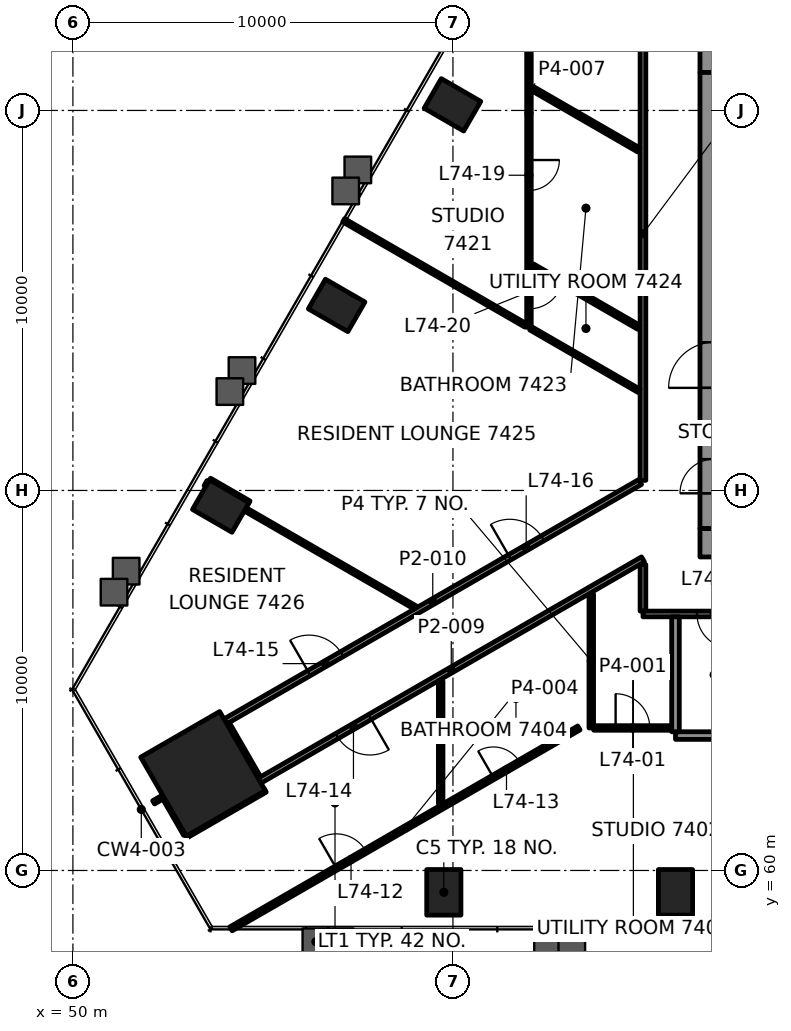
"""IFC4 building model, lengths in metres.
Left out: names, types, materials, properties, quantities, classifications, styles, units other than length and angle.
Written with IfcOpenShell. Run it as: python <this file> out.ifc"""

import sys

from ifc_helpers import new_model, si_unit, direction, frame, frame_2d, origin, origin_2d, place, context, subcontext, project, spatial, rectangle, hollow_rectangle, extrude, element, fill, save


model = new_model("IFC4")
c1 = context("Model", 3, precision=1e-05, world=origin(), true_north=direction((0.0, 1.0)))
c2 = subcontext(c1, "Body", "Model", "MODEL_VIEW")
j1 = project(units=[si_unit("LENGTHUNIT", "METRE"), si_unit("PLANEANGLEUNIT", "RADIAN")], contexts=[c1])
p1 = place(None, origin())
s1 = spatial("IfcSite", under=j1, at=p1, CompositionType="ELEMENT")
p2 = place(p1, origin())
s2 = spatial("IfcBuilding", under=s1, at=p2, CompositionType="ELEMENT")
p3 = place(p2, frame((0.0, 0.0, 305.6)))
s3 = spatial("IfcBuildingStorey", under=s2, at=p3, CompositionType="ELEMENT", Elevation=305.6)
p4 = place(p3, frame((53.423, 62.542, 0.0), z_axis=(0.0, 0.0, 1.0), x_axis=(0.5, -0.866025403784, 0.0)))
e1 = element("IfcColumn", 1, at=p4, inside=s3, PredefinedType="COLUMN", context=c2, shape_type="SweptSolid", body=[
    extrude(rectangle(XDim=2.4, YDim=2.4, at=origin_2d()), origin(), (0.0, 0.0, 1.0), 3.5),
])
for number, where, z_axis, x_axis in (
    (2, (59.76, 59.425, -0.0), (0.0, 0.0, 1.0), (1.0, 0.0, 0.0)),
    (3, (65.856, 59.425, -0.0), (0.0, 0.0, 1.0), (1.0, 0.0, 0.0)),
    (4, (59.987, 80.148, -0.0), (0.0, 0.0, 1.0), (-0.5, -0.866, 0.0)),
    (5, (56.939, 74.869, -0.0), (0.0, 0.0, 1.0), (-0.5, -0.866, 0.0)),
    (6, (53.891, 69.589, -0.0), (0.0, 0.0, 1.0), (-0.5, -0.866, 0.0)),
):
    element("IfcColumn", number, at=place(p3, frame(where, z_axis=z_axis, x_axis=x_axis)), inside=s3, PredefinedType="COLUMN", context=c2, shape_type="SweptSolid", body=[
        extrude(hollow_rectangle(XDim=0.9, YDim=1.2, WallThickness=0.06, at=origin_2d()), origin(), (0.0, 0.0, 1.0), 3.5),
    ])
p5 = place(p3, frame((66.5, 68.625, 0.0), z_axis=(0.0, 0.0, 1.0), x_axis=(1.0, 0.0, 0.0)))
e7 = element("IfcWall", 7, at=p5, inside=s3, PredefinedType="SHEAR", context=c2, shape_type="SweptSolid", body=[
    extrude(rectangle(XDim=17.0, YDim=0.75, at=frame_2d((8.5, 0.0))), origin(), (0.0, 0.0, 1.0), 3.3),
])
p6 = place(p5, frame((2.7, 0.0, 0.0)))
e8 = element("IfcOpeningElement", 8, at=p6, cuts=e7, PredefinedType="OPENING", context=c2, shape_type="SweptSolid", body=[
    extrude(rectangle(XDim=0.9, YDim=2.1, at=frame_2d((0.45, 1.05))), frame((0.0, 0.385, 0.0), z_axis=(0.0, -1.0, 0.0), x_axis=(1.0, 0.0, 0.0)), (0.0, 0.0, 1.0), 0.77),
])
p7 = place(p3, frame((66.5, 81.375, 0.0), z_axis=(0.0, 0.0, 1.0), x_axis=(1.0, 0.0, 0.0)))
e9 = element("IfcWall", 9, at=p7, inside=s3, PredefinedType="SHEAR", context=c2, shape_type="SweptSolid", body=[
    extrude(rectangle(XDim=17.0, YDim=0.75, at=frame_2d((8.5, 0.0))), origin(), (0.0, 0.0, 1.0), 3.3),
])
p8 = place(p7, frame((1.195, 0.0, 0.0)))
e10 = element("IfcOpeningElement", 10, at=p8, cuts=e9, PredefinedType="OPENING", context=c2, shape_type="SweptSolid", body=[
    extrude(rectangle(XDim=1.0, YDim=2.1, at=frame_2d((0.5, 1.05))), frame((0.0, 0.385, 0.0), z_axis=(0.0, -1.0, 0.0), x_axis=(1.0, 0.0, 0.0)), (0.0, 0.0, 1.0), 0.77),
])
p9 = place(p7, frame((15.005, 0.0, 0.0)))
e11 = element("IfcOpeningElement", 11, at=p9, cuts=e9, PredefinedType="OPENING", context=c2, shape_type="SweptSolid", body=[
    extrude(rectangle(XDim=1.0, YDim=2.1, at=frame_2d((0.5, 1.05))), frame((0.0, 0.385, 0.0), z_axis=(0.0, -1.0, 0.0), x_axis=(1.0, 0.0, 0.0)), (0.0, 0.0, 1.0), 0.77),
])
p10 = place(p7, frame((8.15, 0.0, 0.0)))
e12 = element("IfcOpeningElement", 12, at=p10, cuts=e9, PredefinedType="OPENING", context=c2, shape_type="SweptSolid", body=[
    extrude(rectangle(XDim=0.9, YDim=2.1, at=frame_2d((0.45, 1.05))), frame((0.0, 0.385, 0.0), z_axis=(0.0, -1.0, 0.0), x_axis=(1.0, 0.0, 0.0)), (0.0, 0.0, 1.0), 0.77),
])
p11 = place(p3, frame((66.875, 69.0, 0.0), z_axis=(0.0, 0.0, 1.0), x_axis=(0.0, 1.0, 0.0)))
e13 = element("IfcWall", 13, at=p11, inside=s3, PredefinedType="SHEAR", context=c2, shape_type="SweptSolid", body=[
    extrude(rectangle(XDim=12.0, YDim=0.75, at=frame_2d((6.0, 0.0))), origin(), (0.0, 0.0, 1.0), 3.3),
])
p12 = place(p11, frame((3.7, 0.0, 0.0)))
e14 = element("IfcOpeningElement", 14, at=p12, cuts=e13, PredefinedType="OPENING", context=c2, shape_type="SweptSolid", body=[
    extrude(rectangle(XDim=1.2, YDim=2.1, at=frame_2d((0.6, 1.05))), frame((0.0, 0.385, 0.0), z_axis=(0.0, -1.0, 0.0), x_axis=(1.0, 0.0, 0.0)), (0.0, 0.0, 1.0), 0.77),
])
p13 = place(p11, frame((0.925, 0.0, 0.0)))
e15 = element("IfcOpeningElement", 15, at=p13, cuts=e13, PredefinedType="OPENING", context=c2, shape_type="SweptSolid", body=[
    extrude(rectangle(XDim=0.9, YDim=2.1, at=frame_2d((0.45, 1.05))), frame((0.0, 0.385, 0.0), z_axis=(0.0, -1.0, 0.0), x_axis=(1.0, 0.0, 0.0)), (0.0, 0.0, 1.0), 0.77),
])
p14 = place(p3, frame((65.856, 63.55, 0.0), z_axis=(0.0, 0.0, 1.0), x_axis=(1.0, 0.0, 0.0)))
e16 = element("IfcWall", 16, at=p14, inside=s3, PredefinedType="PARTITIONING", context=c2, shape_type="SweptSolid", body=[
    extrude(rectangle(XDim=8.128, YDim=0.2, at=frame_2d((4.064, 0.0))), origin(), (0.0, 0.0, 1.0), 2.7),
])
p15 = place(p3, frame((63.704, 63.75, 0.0), z_axis=(0.0, 0.0, 1.0), x_axis=(1.0, 0.0, 0.0)))
e17 = element("IfcWall", 17, at=p15, inside=s3, PredefinedType="PARTITIONING", context=c2, shape_type="SweptSolid", body=[
    extrude(rectangle(XDim=2.052, YDim=0.12, at=frame_2d((1.026, 0.0))), origin(), (0.0, 0.0, 1.0), 2.7),
])
p16 = place(p15, frame((0.576, 0.0, 0.0)))
e18 = element("IfcOpeningElement", 18, at=p16, cuts=e17, PredefinedType="OPENING", context=c2, shape_type="SweptSolid", body=[
    extrude(rectangle(XDim=0.9, YDim=2.1, at=frame_2d((0.45, 1.05))), frame((0.0, 0.07, 0.0), z_axis=(0.0, -1.0, 0.0), x_axis=(1.0, 0.0, 0.0)), (0.0, 0.0, 1.0), 0.14),
])
p17 = place(p3, frame((85.0, 66.75, 0.0), z_axis=(0.0, 0.0, 1.0), x_axis=(-1.0, 0.0, 0.0)))
e19 = element("IfcWall", 19, at=p17, inside=s3, PredefinedType="PARTITIONING", context=c2, shape_type="SweptSolid", body=[
    extrude(rectangle(XDim=20.0, YDim=0.15, at=frame_2d((10.0, 0.0))), origin(), (0.0, 0.0, 1.0), 2.7),
])
p18 = place(p17, frame((5.486, 0.0, 0.0)))
e20 = element("IfcOpeningElement", 20, at=p18, cuts=e19, PredefinedType="OPENING", context=c2, shape_type="SweptSolid", body=[
    extrude(rectangle(XDim=0.9, YDim=2.1, at=frame_2d((0.45, 1.05))), frame((0.0, 0.085, 0.0), z_axis=(0.0, -1.0, 0.0), x_axis=(1.0, 0.0, 0.0)), (0.0, 0.0, 1.0), 0.17),
])
p19 = place(p17, frame((11.582, 0.0, 0.0)))
e21 = element("IfcOpeningElement", 21, at=p19, cuts=e19, PredefinedType="OPENING", context=c2, shape_type="SweptSolid", body=[
    extrude(rectangle(XDim=0.9, YDim=2.1, at=frame_2d((0.45, 1.05))), frame((0.0, 0.085, 0.0), z_axis=(0.0, -1.0, 0.0), x_axis=(1.0, 0.0, 0.0)), (0.0, 0.0, 1.0), 0.17),
])
p20 = place(p17, frame((13.614, 0.0, 0.0)))
e22 = element("IfcOpeningElement", 22, at=p20, cuts=e19, PredefinedType="OPENING", context=c2, shape_type="SweptSolid", body=[
    extrude(rectangle(XDim=0.9, YDim=2.1, at=frame_2d((0.45, 1.05))), frame((0.0, 0.085, 0.0), z_axis=(0.0, -1.0, 0.0), x_axis=(1.0, 0.0, 0.0)), (0.0, 0.0, 1.0), 0.17),
])
p21 = place(p17, frame((15.646, 0.0, 0.0)))
e23 = element("IfcOpeningElement", 23, at=p21, cuts=e19, PredefinedType="OPENING", context=c2, shape_type="SweptSolid", body=[
    extrude(rectangle(XDim=0.9, YDim=2.1, at=frame_2d((0.45, 1.05))), frame((0.0, 0.085, 0.0), z_axis=(0.0, -1.0, 0.0), x_axis=(1.0, 0.0, 0.0)), (0.0, 0.0, 1.0), 0.17),
])
p22 = place(p17, frame((17.678, 0.0, 0.0)))
e24 = element("IfcOpeningElement", 24, at=p22, cuts=e19, PredefinedType="OPENING", context=c2, shape_type="SweptSolid", body=[
    extrude(rectangle(XDim=0.9, YDim=2.1, at=frame_2d((0.45, 1.05))), frame((0.0, 0.085, 0.0), z_axis=(0.0, -1.0, 0.0), x_axis=(1.0, 0.0, 0.0)), (0.0, 0.0, 1.0), 0.17),
])
p23 = place(p3, frame((54.16, 58.465, 0.0), z_axis=(0.0, 0.0, 1.0), x_axis=(0.866034434898, 0.499984357326, 0.0)))
e25 = element("IfcWall", 25, at=p23, inside=s3, PredefinedType="PARTITIONING", context=c2, shape_type="SweptSolid", body=[
    extrude(rectangle(XDim=10.571, YDim=0.12, at=frame_2d((5.285, 0.0))), origin(), (0.0, 0.0, 1.0), 2.7),
])
p24 = place(p23, frame((3.197, 0.0, 0.0)))
e26 = element("IfcOpeningElement", 26, at=p24, cuts=e25, PredefinedType="OPENING", context=c2, shape_type="SweptSolid", body=[
    extrude(rectangle(XDim=0.9, YDim=2.1, at=frame_2d((0.45, 1.05))), frame((0.0, 0.07, 0.0), z_axis=(0.0, -1.0, 0.0), x_axis=(1.0, 0.0, 0.0)), (0.0, 0.0, 1.0), 0.14),
])
p25 = place(p23, frame((7.97, 0.0, 0.0)))
e27 = element("IfcOpeningElement", 27, at=p25, cuts=e25, PredefinedType="OPENING", context=c2, shape_type="SweptSolid", body=[
    extrude(rectangle(XDim=0.8, YDim=2.1, at=frame_2d((0.4, 1.05))), frame((0.0, 0.07, 0.0), z_axis=(0.0, -1.0, 0.0), x_axis=(1.0, 0.0, 0.0)), (0.0, 0.0, 1.0), 0.14),
])
p26 = place(p3, frame((52.984, 60.904, 0.0), z_axis=(0.0, 0.0, 1.0), x_axis=(0.866011011868, 0.500024926702, 0.0)))
e28 = element("IfcWall", 28, at=p26, inside=s3, PredefinedType="PARTITIONING", context=c2, shape_type="SweptSolid", body=[
    extrude(rectangle(XDim=2.399, YDim=0.1, at=frame_2d((1.199, 0.0))), origin(), (0.0, 0.0, 1.0), 2.7),
])
p27 = place(p3, frame((65.0, 68.187, 0.0), z_axis=(0.0, 0.0, 1.0), x_axis=(-0.866026430432, -0.49999822179, 0.0)))
e29 = element("IfcWall", 29, at=p27, inside=s3, PredefinedType="PARTITIONING", context=c2, shape_type="SweptSolid", body=[
    extrude(rectangle(XDim=11.648, YDim=0.15, at=frame_2d((5.824, 0.0))), origin(), (0.0, 0.0, 1.0), 2.547),
])
p28 = place(p27, frame((8.296, 0.0, 0.0)))
e30 = element("IfcOpeningElement", 30, at=p28, cuts=e29, PredefinedType="OPENING", context=c2, shape_type="SweptSolid", body=[
    extrude(rectangle(XDim=1.0, YDim=2.1, at=frame_2d((0.5, 1.05))), frame((0.0, 0.085, 0.0), z_axis=(0.0, -1.0, 0.0), x_axis=(1.0, 0.0, 0.0)), (0.0, 0.0, 1.0), 0.17),
])
p29 = place(p3, frame((52.124, 61.792, 0.0), z_axis=(0.0, 0.0, 1.0), x_axis=(0.866006330792, 0.500033033937, 0.0)))
e31 = element("IfcWall", 31, at=p29, inside=s3, PredefinedType="PARTITIONING", context=c2, shape_type="SweptSolid", body=[
    extrude(rectangle(XDim=0.25, YDim=0.1, at=frame_2d((0.125, 0.0))), origin(), (0.0, 0.0, 1.0), 2.7),
])
p30 = place(p3, frame((54.012, 63.922, 0.0), z_axis=(0.0, 0.0, 1.0), x_axis=(0.866028779199, 0.499994153564, 0.0)))
e32 = element("IfcWall", 32, at=p30, inside=s3, PredefinedType="PARTITIONING", context=c2, shape_type="SweptSolid", body=[
    extrude(rectangle(XDim=12.601, YDim=0.15, at=frame_2d((6.3, 0.0))), origin(), (0.0, 0.0, 1.0), 2.7),
])
p31 = place(p30, frame((2.542, 0.0, 0.0)))
e33 = element("IfcOpeningElement", 33, at=p31, cuts=e32, PredefinedType="OPENING", context=c2, shape_type="SweptSolid", body=[
    extrude(rectangle(XDim=1.0, YDim=2.1, at=frame_2d((0.5, 1.05))), frame((0.0, 0.085, 0.0), z_axis=(0.0, -1.0, 0.0), x_axis=(1.0, 0.0, 0.0)), (0.0, 0.0, 1.0), 0.17),
])
p32 = place(p30, frame((8.639, 0.0, 0.0)))
e34 = element("IfcOpeningElement", 34, at=p32, cuts=e32, PredefinedType="OPENING", context=c2, shape_type="SweptSolid", body=[
    extrude(rectangle(XDim=1.0, YDim=2.1, at=frame_2d((0.5, 1.05))), frame((0.0, 0.085, 0.0), z_axis=(0.0, -1.0, 0.0), x_axis=(1.0, 0.0, 0.0)), (0.0, 0.0, 1.0), 0.17),
])
p33 = place(p3, frame((53.495, 70.102, 0.0), z_axis=(0.0, 0.0, 1.0), x_axis=(0.499906209203, 0.866079547155, 0.0)))
e35 = element("IfcWall", 35, at=p33, inside=s3, PredefinedType="PARTITIONING", context=c2, shape_type="SweptSolid", body=[
    extrude(rectangle(XDim=0.153, YDim=0.1, at=frame_2d((0.077, 0.0))), origin(), (0.0, 0.0, 1.0), 2.7),
])
p34 = place(p3, frame((65.856, 63.65, 0.0), z_axis=(0.0, 0.0, 1.0), x_axis=(0.0, 1.0, 0.0)))
e36 = element("IfcWall", 36, at=p34, inside=s3, PredefinedType="PARTITIONING", context=c2, shape_type="SweptSolid", body=[
    extrude(rectangle(XDim=3.025, YDim=0.2, at=frame_2d((1.513, 0.0))), origin(), (0.0, 0.0, 1.0), 2.7),
])
p35 = place(p3, frame((65.0, 66.825, 0.0), z_axis=(0.0, 0.0, 1.0), x_axis=(0.0, 1.0, 0.0)))
e37 = element("IfcWall", 37, at=p35, inside=s3, PredefinedType="PARTITIONING", context=c2, shape_type="SweptSolid", body=[
    extrude(rectangle(XDim=1.226, YDim=0.15, at=frame_2d((0.613, 0.0))), origin(), (0.0, 0.0, 1.0), 2.547),
])
p36 = place(p3, frame((65.0, 70.266, 0.0), z_axis=(0.0, 0.0, 1.0), x_axis=(0.0, 1.0, 0.0)))
e38 = element("IfcWall", 38, at=p36, inside=s3, PredefinedType="PARTITIONING", context=c2, shape_type="SweptSolid", body=[
    extrude(rectangle(XDim=12.984, YDim=0.15, at=frame_2d((6.492, 0.0))), origin(), (0.0, 0.0, 1.0), 2.7),
])
p37 = place(p3, frame((63.64, 63.75, 0.0), z_axis=(0.0, 0.0, 1.0), x_axis=(0.0, 1.0, 0.0)))
e39 = element("IfcWall", 39, at=p37, inside=s3, PredefinedType="PARTITIONING", context=c2, shape_type="SweptSolid", body=[
    extrude(rectangle(XDim=3.525, YDim=0.12, at=frame_2d((1.763, 0.0))), origin(), (0.0, 0.0, 1.0), 2.547),
])
p38 = place(p3, frame((62.0, 85.554, 0.0), z_axis=(0.0, 0.0, 1.0), x_axis=(0.0, -1.0, 0.0)))
e40 = element("IfcWall", 40, at=p38, inside=s3, PredefinedType="PARTITIONING", context=c2, shape_type="SweptSolid", body=[
    extrude(rectangle(XDim=11.261, YDim=0.12, at=frame_2d((5.63, 0.0))), origin(), (0.0, 0.0, 1.0), 2.688),
])
p39 = place(p38, frame((2.6, 0.0, 0.0)))
e41 = element("IfcOpeningElement", 41, at=p39, cuts=e40, PredefinedType="OPENING", context=c2, shape_type="SweptSolid", body=[
    extrude(rectangle(XDim=0.9, YDim=2.1, at=frame_2d((0.45, 1.05))), frame((0.0, 0.07, 0.0), z_axis=(0.0, -1.0, 0.0), x_axis=(1.0, 0.0, 0.0)), (0.0, 0.0, 1.0), 0.14),
])
p40 = place(p38, frame((6.859, 0.0, 0.0)))
e42 = element("IfcOpeningElement", 42, at=p40, cuts=e40, PredefinedType="OPENING", context=c2, shape_type="SweptSolid", body=[
    extrude(rectangle(XDim=0.8, YDim=2.1, at=frame_2d((0.4, 1.05))), frame((0.0, 0.07, 0.0), z_axis=(0.0, -1.0, 0.0), x_axis=(1.0, 0.0, 0.0)), (0.0, 0.0, 1.0), 0.14),
])
p41 = place(p38, frame((9.876, 0.0, 0.0)))
e43 = element("IfcOpeningElement", 43, at=p41, cuts=e40, PredefinedType="OPENING", context=c2, shape_type="SweptSolid", body=[
    extrude(rectangle(XDim=0.9, YDim=2.1, at=frame_2d((0.45, 1.05))), frame((0.0, 0.07, 0.0), z_axis=(0.0, -1.0, 0.0), x_axis=(1.0, 0.0, 0.0)), (0.0, 0.0, 1.0), 0.14),
])
p42 = place(p3, frame((59.677, 61.759, 0.0), z_axis=(0.0, 0.0, 1.0), x_axis=(0.0, 1.0, 0.0)))
e44 = element("IfcWall", 44, at=p42, inside=s3, PredefinedType="PARTITIONING", context=c2, shape_type="SweptSolid", body=[
    extrude(rectangle(XDim=3.228, YDim=0.12, at=frame_2d((1.614, 0.0))), origin(), (0.0, 0.0, 1.0), 2.7),
])
p43 = place(p3, frame((54.872, 62.433, 0.0), z_axis=(0.0, 0.0, 1.0), x_axis=(-0.499988108725, 0.866032269107, 0.0)))
e45 = element("IfcWall", 45, at=p43, inside=s3, PredefinedType="PARTITIONING", context=c2, shape_type="SweptSolid", body=[
    extrude(rectangle(XDim=1.644, YDim=0.15, at=frame_2d((0.822, 0.0))), origin(), (0.0, 0.0, 1.0), 2.547),
])
p44 = place(p3, frame((52.958, 60.947, 0.0), z_axis=(0.0, 0.0, 1.0), x_axis=(-0.499955427682, 0.866051136095, 0.0)))
e46 = element("IfcWall", 46, at=p44, inside=s3, PredefinedType="PARTITIONING", context=c2, shape_type="SweptSolid", body=[
    extrude(rectangle(XDim=1.149, YDim=0.1, at=frame_2d((0.574, 0.0))), origin(), (0.0, 0.0, 1.0), 2.7),
])
for number, where, z_axis, x_axis in (
    (47, (64.89, 78.959, 0.0), (0.0, 0.0, 1.0), (-0.866, 0.5, 0.0)),
    (48, (64.89, 74.293, 0.0), (0.0, 0.0, 1.0), (-0.866, 0.5, 0.0)),
):
    element("IfcWall", number, at=place(p3, frame(where, z_axis=z_axis, x_axis=x_axis)), inside=s3, PredefinedType="PARTITIONING", context=c2, shape_type="SweptSolid", body=[
        extrude(rectangle(XDim=3.228, YDim=0.12, at=frame_2d((1.614, 0.0))), origin(), (0.0, 0.0, 1.0), 2.7),
    ])
p45 = place(p3, frame((64.899, 72.62, 0.0), z_axis=(0.0, 0.0, 1.0), x_axis=(-0.866032610133, 0.499987518031, 0.0)))
e49 = element("IfcWall", 49, at=p45, inside=s3, PredefinedType="PARTITIONING", context=c2, shape_type="SweptSolid", body=[
    extrude(rectangle(XDim=3.295, YDim=0.1, at=frame_2d((1.648, 0.0))), origin(), (0.0, 0.0, 1.0), 2.7),
])
p46 = place(p3, frame((54.636, 69.679, 0.0), z_axis=(0.0, 0.0, 1.0), x_axis=(-0.865978732077, 0.500080829057, 0.0)))
e50 = element("IfcWall", 50, at=p46, inside=s3, PredefinedType="PARTITIONING", context=c2, shape_type="SweptSolid", body=[
    extrude(rectangle(XDim=1.199, YDim=0.1, at=frame_2d((0.6, 0.0))), origin(), (0.0, 0.0, 1.0), 2.7),
])
p47 = place(p3, frame((59.005, 66.921, 0.0), z_axis=(0.0, 0.0, 1.0), x_axis=(-0.866022552607, 0.500004938352, 0.0)))
e51 = element("IfcWall", 51, at=p47, inside=s3, PredefinedType="PARTITIONING", context=c2, shape_type="SweptSolid", body=[
    extrude(rectangle(XDim=5.162, YDim=0.1, at=frame_2d((2.581, 0.0))), origin(), (0.0, 0.0, 1.0), 2.7),
])
p48 = place(p3, frame((61.915, 74.343, 0.0), z_axis=(0.0, 0.0, 1.0), x_axis=(-0.866023907196, 0.500002592159, 0.0)))
e52 = element("IfcWall", 52, at=p48, inside=s3, PredefinedType="PARTITIONING", context=c2, shape_type="SweptSolid", body=[
    extrude(rectangle(XDim=5.532, YDim=0.1, at=frame_2d((2.766, 0.0))), origin(), (0.0, 0.0, 1.0), 2.688),
])
p49 = place(p16, origin())
e53 = element("IfcDoor", 53, at=p49, inside=s3, OperationType="SINGLE_SWING_LEFT", PredefinedType="DOOR", context=c2, shape_type="SweptSolid", body=[
    extrude(rectangle(XDim=0.9, YDim=2.1, at=frame_2d((0.45, 1.05))), frame((0.0, 0.025, 0.0), z_axis=(0.0, -1.0, 0.0), x_axis=(1.0, 0.0, 0.0)), (0.0, 0.0, 1.0), 0.05),
])
fill(e18, e53)
p50 = place(p22, origin())
e54 = element("IfcDoor", 54, at=p50, inside=s3, OperationType="SINGLE_SWING_RIGHT", PredefinedType="DOOR", context=c2, shape_type="SweptSolid", body=[
    extrude(rectangle(XDim=0.9, YDim=2.1, at=frame_2d((0.45, 1.05))), frame((0.0, 0.025, 0.0), z_axis=(0.0, -1.0, 0.0), x_axis=(1.0, 0.0, 0.0)), (0.0, 0.0, 1.0), 0.05),
])
fill(e24, e54)
p51 = place(p24, origin())
e55 = element("IfcDoor", 55, at=p51, inside=s3, OperationType="SINGLE_SWING_RIGHT", PredefinedType="DOOR", context=c2, shape_type="SweptSolid", body=[
    extrude(rectangle(XDim=0.9, YDim=2.1, at=frame_2d((0.45, 1.05))), frame((0.0, 0.025, 0.0), z_axis=(0.0, -1.0, 0.0), x_axis=(1.0, 0.0, 0.0)), (0.0, 0.0, 1.0), 0.05),
])
fill(e26, e55)
p52 = place(p25, origin())
e56 = element("IfcDoor", 56, at=p52, inside=s3, OperationType="SINGLE_SWING_RIGHT", PredefinedType="DOOR", context=c2, shape_type="SweptSolid", body=[
    extrude(rectangle(XDim=0.8, YDim=2.1, at=frame_2d((0.4, 1.05))), frame((0.0, 0.025, 0.0), z_axis=(0.0, -1.0, 0.0), x_axis=(1.0, 0.0, 0.0)), (0.0, 0.0, 1.0), 0.05),
])
fill(e27, e56)
p53 = place(p28, origin())
e57 = element("IfcDoor", 57, at=p53, inside=s3, OperationType="SINGLE_SWING_RIGHT", PredefinedType="DOOR", context=c2, shape_type="SweptSolid", body=[
    extrude(rectangle(XDim=1.0, YDim=2.1, at=frame_2d((0.5, 1.05))), frame((0.0, 0.025, 0.0), z_axis=(0.0, -1.0, 0.0), x_axis=(1.0, 0.0, 0.0)), (0.0, 0.0, 1.0), 0.05),
])
fill(e30, e57)
p54 = place(p31, origin())
e58 = element("IfcDoor", 58, at=p54, inside=s3, OperationType="SINGLE_SWING_LEFT", PredefinedType="DOOR", context=c2, shape_type="SweptSolid", body=[
    extrude(rectangle(XDim=1.0, YDim=2.1, at=frame_2d((0.5, 1.05))), frame((0.0, 0.025, 0.0), z_axis=(0.0, -1.0, 0.0), x_axis=(1.0, 0.0, 0.0)), (0.0, 0.0, 1.0), 0.05),
])
fill(e33, e58)
p55 = place(p32, origin())
e59 = element("IfcDoor", 59, at=p55, inside=s3, OperationType="SINGLE_SWING_RIGHT", PredefinedType="DOOR", context=c2, shape_type="SweptSolid", body=[
    extrude(rectangle(XDim=1.0, YDim=2.1, at=frame_2d((0.5, 1.05))), frame((0.0, 0.025, 0.0), z_axis=(0.0, -1.0, 0.0), x_axis=(1.0, 0.0, 0.0)), (0.0, 0.0, 1.0), 0.05),
])
fill(e34, e59)
p56 = place(p40, origin())
e60 = element("IfcDoor", 60, at=p56, inside=s3, OperationType="SINGLE_SWING_RIGHT", PredefinedType="DOOR", context=c2, shape_type="SweptSolid", body=[
    extrude(rectangle(XDim=0.8, YDim=2.1, at=frame_2d((0.4, 1.05))), frame((0.0, 0.025, 0.0), z_axis=(0.0, -1.0, 0.0), x_axis=(1.0, 0.0, 0.0)), (0.0, 0.0, 1.0), 0.05),
])
fill(e42, e60)
p57 = place(p41, origin())
e61 = element("IfcDoor", 61, at=p57, inside=s3, OperationType="SINGLE_SWING_LEFT", PredefinedType="DOOR", context=c2, shape_type="SweptSolid", body=[
    extrude(rectangle(XDim=0.9, YDim=2.1, at=frame_2d((0.45, 1.05))), frame((0.0, 0.025, 0.0), z_axis=(0.0, -1.0, 0.0), x_axis=(1.0, 0.0, 0.0)), (0.0, 0.0, 1.0), 0.05),
])
fill(e43, e61)
p58 = place(p12, origin())
e62 = element("IfcDoor", 62, at=p58, inside=s3, OperationType="SINGLE_SWING_RIGHT", PredefinedType="DOOR", context=c2, shape_type="SweptSolid", body=[
    extrude(rectangle(XDim=1.2, YDim=2.1, at=frame_2d((0.6, 1.05))), frame((0.0, 0.095, 0.0), z_axis=(0.0, -1.0, 0.0), x_axis=(1.0, 0.0, 0.0)), (0.0, 0.0, 1.0), 0.19),
])
fill(e14, e62)
p59 = place(p13, origin())
e63 = element("IfcDoor", 63, at=p59, inside=s3, OperationType="SINGLE_SWING_RIGHT", PredefinedType="DOOR", context=c2, shape_type="SweptSolid", body=[
    extrude(rectangle(XDim=0.9, YDim=2.1, at=frame_2d((0.45, 1.05))), frame((0.0, 0.095, 0.0), z_axis=(0.0, -1.0, 0.0), x_axis=(1.0, 0.0, 0.0)), (0.0, 0.0, 1.0), 0.19),
])
fill(e15, e63)
save(model, sys.argv[1])
